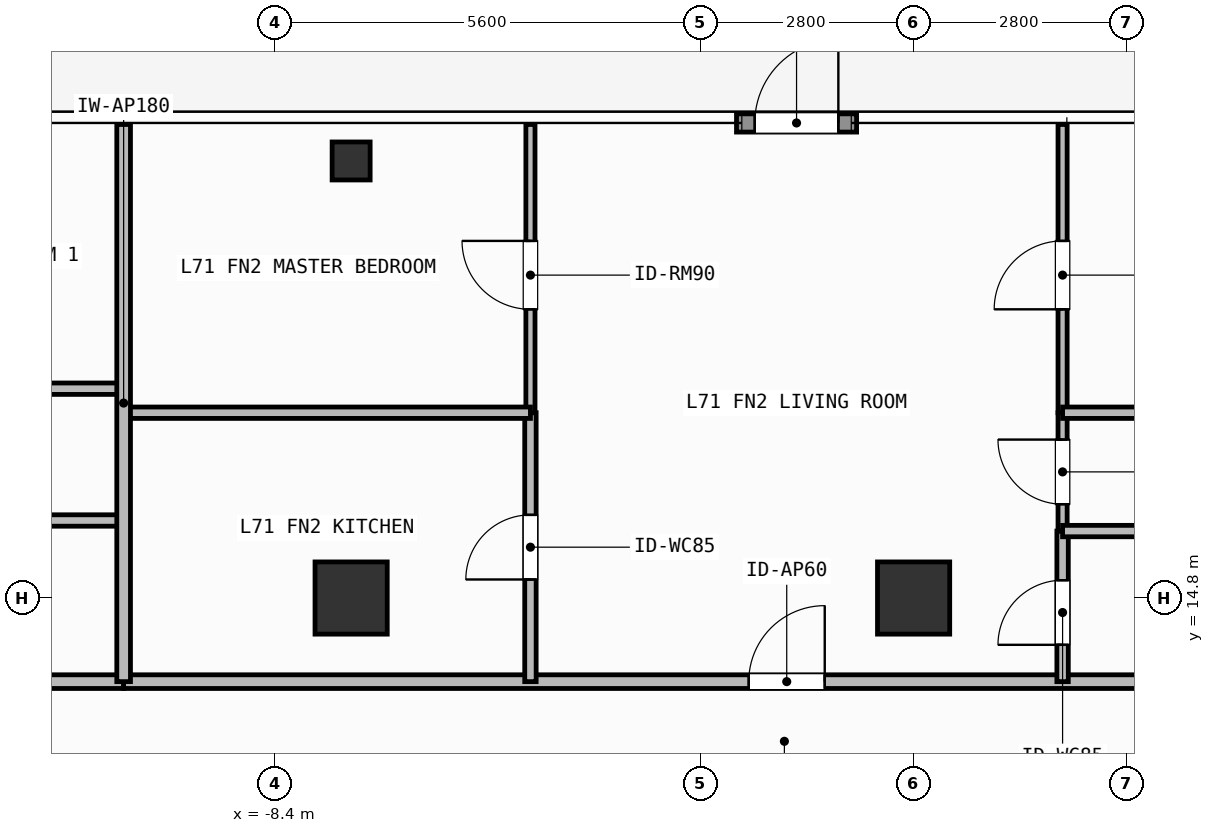
"""IFC4 building model, lengths in metres.
Left out: names, types, materials, properties, quantities, classifications, styles, units other than length and angle.
Written with IfcOpenShell. Run it as: python <this file> out.ifc"""

import sys

from ifc_helpers import new_model, si_unit, direction, frame, frame_2d, origin, origin_2d, place, context, subcontext, project, spatial, rectangle, hollow_rectangle, extrude, element, fill, save


model = new_model("IFC4")
c1 = context("Model", 3, precision=1e-05, world=origin(), true_north=direction((0.0, 1.0)))
c2 = subcontext(c1, "Body", "Model", "MODEL_VIEW")
j1 = project(units=[si_unit("LENGTHUNIT", "METRE"), si_unit("PLANEANGLEUNIT", "RADIAN")], contexts=[c1])
p1 = place(None, origin())
s1 = spatial("IfcSite", under=j1, at=p1, CompositionType="ELEMENT")
p2 = place(p1, origin())
s2 = spatial("IfcBuilding", under=s1, at=p2, CompositionType="ELEMENT")
p3 = place(p2, frame((0.0, 0.0, 289.8)))
s3 = spatial("IfcBuildingStorey", under=s2, at=p3, CompositionType="ELEMENT", Elevation=289.8)
for number, where, z_axis, x_axis in (
    (1, (-7.4, 14.8, 0.0), (0.0, 0.0, 1.0), (1.0, 0.0, 0.0)),
    (2, (0.0, 14.8, 0.0), (0.0, 0.0, 1.0), (1.0, 0.0, 0.0)),
):
    element("IfcColumn", number, at=place(p3, frame(where, z_axis=z_axis, x_axis=x_axis)), inside=s3, PredefinedType="COLUMN", context=c2, shape_type="SweptSolid", body=[
        extrude(rectangle(XDim=0.95, YDim=0.95, at=origin_2d()), origin(), (0.0, 0.0, 1.0), 3.9),
    ])
p4 = place(p3, frame((-7.4, 20.55, 0.0), z_axis=(0.0, 0.0, 1.0), x_axis=(1.0, 0.0, 0.0)))
e3 = element("IfcColumn", 3, at=p4, inside=s3, PredefinedType="COLUMN", context=c2, shape_type="SweptSolid", body=[
    extrude(hollow_rectangle(XDim=0.5, YDim=0.5, WallThickness=0.025, at=origin_2d()), origin(), (0.0, 0.0, 1.0), 3.9),
])
p5 = place(p3, frame((-2.33, 21.05, 0.0), z_axis=(0.0, 0.0, 1.0), x_axis=(1.0, 0.0, 0.0)))
e4 = element("IfcWall", 4, at=p5, inside=s3, PredefinedType="SOLIDWALL", context=c2, shape_type="SweptSolid", body=[
    extrude(rectangle(XDim=1.58, YDim=0.24, at=frame_2d((0.79, 0.0))), origin(), (0.0, 0.0, 1.0), 3.68),
])
p6 = place(p5, frame((0.24, 0.0, 0.0)))
e5 = element("IfcOpeningElement", 5, at=p6, cuts=e4, PredefinedType="OPENING", context=c2, shape_type="SweptSolid", body=[
    extrude(rectangle(XDim=1.1, YDim=2.2, at=frame_2d((0.55, 1.1))), frame((0.0, 0.13, 0.0), z_axis=(0.0, -1.0, 0.0), x_axis=(1.0, 0.0, 0.0)), (0.0, 0.0, 1.0), 0.26),
])
p7 = place(p3, frame((-19.32, 13.7, 0.0), z_axis=(0.0, 0.0, 1.0), x_axis=(1.0, 0.0, 0.0)))
e6 = element("IfcWall", 6, at=p7, inside=s3, PredefinedType="PARTITIONING", context=c2, shape_type="SweptSolid", body=[
    extrude(rectangle(XDim=8.927, YDim=0.18, at=frame_2d((4.463, 0.0))), origin(), (0.0, 0.0, 1.0), 3.68),
])
p8 = place(p7, frame((1.398, 0.0, 0.0)))
e7 = element("IfcOpeningElement", 7, at=p8, cuts=e6, PredefinedType="OPENING", context=c2, shape_type="SweptSolid", body=[
    extrude(rectangle(XDim=1.0, YDim=2.2, at=frame_2d((0.5, 1.1))), frame((0.0, 0.1, 0.0), z_axis=(0.0, -1.0, 0.0), x_axis=(1.0, 0.0, 0.0)), (0.0, 0.0, 1.0), 0.2),
])
p9 = place(p3, frame((-10.393, 13.7, 0.0), z_axis=(0.0, 0.0, 1.0), x_axis=(1.0, 0.0, 0.0)))
e8 = element("IfcWall", 8, at=p9, inside=s3, PredefinedType="PARTITIONING", context=c2, shape_type="SweptSolid", body=[
    extrude(rectangle(XDim=15.835, YDim=0.18, at=frame_2d((7.917, 0.0))), origin(), (0.0, 0.0, 1.0), 3.68),
])
p10 = place(p9, frame((8.224, 0.0, 0.0)))
e9 = element("IfcOpeningElement", 9, at=p10, cuts=e8, PredefinedType="OPENING", context=c2, shape_type="SweptSolid", body=[
    extrude(rectangle(XDim=1.0, YDim=2.2, at=frame_2d((0.5, 1.1))), frame((0.0, 0.1, 0.0), z_axis=(0.0, -1.0, 0.0), x_axis=(1.0, 0.0, 0.0)), (0.0, 0.0, 1.0), 0.2),
])
p11 = place(p3, frame((-5.041, 13.7, 0.0), z_axis=(0.0, 0.0, 1.0), x_axis=(0.0, 1.0, 0.0)))
e10 = element("IfcWall", 10, at=p11, inside=s3, PredefinedType="PARTITIONING", context=c2, shape_type="SweptSolid", body=[
    extrude(rectangle(XDim=3.538, YDim=0.15, at=frame_2d((1.769, 0.0))), origin(), (0.0, 0.0, 1.0), 3.68),
])
p12 = place(p11, frame((1.344, 0.0, 0.0)))
e11 = element("IfcOpeningElement", 11, at=p12, cuts=e10, PredefinedType="OPENING", context=c2, shape_type="SweptSolid", body=[
    extrude(rectangle(XDim=0.85, YDim=2.1, at=frame_2d((0.425, 1.05))), frame((0.0, 0.085, 0.0), z_axis=(0.0, -1.0, 0.0), x_axis=(1.0, 0.0, 0.0)), (0.0, 0.0, 1.0), 0.17),
])
p13 = place(p3, frame((-5.041, 17.238, 0.0), z_axis=(0.0, 0.0, 1.0), x_axis=(0.0, 1.0, 0.0)))
e12 = element("IfcWall", 12, at=p13, inside=s3, PredefinedType="PARTITIONING", context=c2, shape_type="SweptSolid", body=[
    extrude(rectangle(XDim=3.792, YDim=0.12, at=frame_2d((1.896, 0.0))), origin(), (0.0, 0.0, 1.0), 3.68),
])
p14 = place(p13, frame((1.36, 0.0, 0.0)))
e13 = element("IfcOpeningElement", 13, at=p14, cuts=e12, PredefinedType="OPENING", context=c2, shape_type="SweptSolid", body=[
    extrude(rectangle(XDim=0.9, YDim=2.1, at=frame_2d((0.45, 1.05))), frame((0.0, 0.07, 0.0), z_axis=(0.0, -1.0, 0.0), x_axis=(1.0, 0.0, 0.0)), (0.0, 0.0, 1.0), 0.14),
])
p15 = place(p3, frame((1.96, 13.7, 0.0), z_axis=(0.0, 0.0, 1.0), x_axis=(0.0, 1.0, 0.0)))
e14 = element("IfcWall", 14, at=p15, inside=s3, PredefinedType="PARTITIONING", context=c2, shape_type="SweptSolid", body=[
    extrude(rectangle(XDim=1.981, YDim=0.15, at=frame_2d((0.99, 0.0))), origin(), (0.0, 0.0, 1.0), 3.68),
])
p16 = place(p15, frame((0.484, 0.0, 0.0)))
e15 = element("IfcOpeningElement", 15, at=p16, cuts=e14, PredefinedType="OPENING", context=c2, shape_type="SweptSolid", body=[
    extrude(rectangle(XDim=0.85, YDim=2.1, at=frame_2d((0.425, 1.05))), frame((0.0, 0.085, 0.0), z_axis=(0.0, -1.0, 0.0), x_axis=(1.0, 0.0, 0.0)), (0.0, 0.0, 1.0), 0.17),
])
p17 = place(p3, frame((1.96, 15.681, 0.0), z_axis=(0.0, 0.0, 1.0), x_axis=(0.0, 1.0, 0.0)))
e16 = element("IfcWall", 16, at=p17, inside=s3, PredefinedType="PARTITIONING", context=c2, shape_type="SweptSolid", body=[
    extrude(rectangle(XDim=1.557, YDim=0.12, at=frame_2d((0.779, 0.0))), origin(), (0.0, 0.0, 1.0), 3.68),
])
p18 = place(p17, frame((0.354, 0.0, 0.0)))
e17 = element("IfcOpeningElement", 17, at=p18, cuts=e16, PredefinedType="OPENING", context=c2, shape_type="SweptSolid", body=[
    extrude(rectangle(XDim=0.85, YDim=2.1, at=frame_2d((0.425, 1.05))), frame((0.0, 0.07, 0.0), z_axis=(0.0, -1.0, 0.0), x_axis=(1.0, 0.0, 0.0)), (0.0, 0.0, 1.0), 0.14),
])
p19 = place(p3, frame((1.96, 17.238, 0.0), z_axis=(0.0, 0.0, 1.0), x_axis=(0.0, 1.0, 0.0)))
e18 = element("IfcWall", 18, at=p19, inside=s3, PredefinedType="PARTITIONING", context=c2, shape_type="SweptSolid", body=[
    extrude(rectangle(XDim=3.792, YDim=0.12, at=frame_2d((1.896, 0.0))), origin(), (0.0, 0.0, 1.0), 3.68),
])
p20 = place(p19, frame((1.36, 0.0, 0.0)))
e19 = element("IfcOpeningElement", 19, at=p20, cuts=e18, PredefinedType="OPENING", context=c2, shape_type="SweptSolid", body=[
    extrude(rectangle(XDim=0.9, YDim=2.1, at=frame_2d((0.45, 1.05))), frame((0.0, 0.07, 0.0), z_axis=(0.0, -1.0, 0.0), x_axis=(1.0, 0.0, 0.0)), (0.0, 0.0, 1.0), 0.14),
])
for number, where, z_axis, x_axis in (
    (20, (-16.57, 15.82, 0.0), (0.0, 0.0, 1.0), (1.0, 0.0, 0.0)),
    (21, (-16.57, 17.554, 0.0), (0.0, 0.0, 1.0), (1.0, 0.0, 0.0)),
):
    element("IfcWall", number, at=place(p3, frame(where, z_axis=z_axis, x_axis=x_axis)), inside=s3, PredefinedType="PARTITIONING", context=c2, shape_type="SweptSolid", body=[
        extrude(rectangle(XDim=6.177, YDim=0.15, at=frame_2d((3.088, 0.0))), origin(), (0.0, 0.0, 1.0), 3.68),
    ])
p21 = place(p3, frame((-10.393, 17.238, 0.0), z_axis=(0.0, 0.0, 1.0), x_axis=(1.0, 0.0, 0.0)))
e22 = element("IfcWall", 22, at=p21, inside=s3, PredefinedType="PARTITIONING", context=c2, shape_type="SweptSolid", body=[
    extrude(rectangle(XDim=5.352, YDim=0.15, at=frame_2d((2.676, 0.0))), origin(), (0.0, 0.0, 1.0), 3.68),
])
for number, where, z_axis, x_axis in (
    (23, (1.96, 15.681, 0.0), (0.0, 0.0, 1.0), (1.0, 0.0, 0.0)),
    (24, (1.96, 17.238, 0.0), (0.0, 0.0, 1.0), (1.0, 0.0, 0.0)),
):
    element("IfcWall", number, at=place(p3, frame(where, z_axis=z_axis, x_axis=x_axis)), inside=s3, PredefinedType="PARTITIONING", context=c2, shape_type="SweptSolid", body=[
        extrude(rectangle(XDim=3.482, YDim=0.15, at=frame_2d((1.741, 0.0))), origin(), (0.0, 0.0, 1.0), 3.68),
    ])
p22 = place(p3, frame((-10.393, 13.7, 0.0), z_axis=(0.0, 0.0, 1.0), x_axis=(0.0, 1.0, 0.0)))
e25 = element("IfcWall", 25, at=p22, inside=s3, PredefinedType="PARTITIONING", context=c2, shape_type="SweptSolid", body=[
    extrude(rectangle(XDim=7.33, YDim=0.18, at=frame_2d((3.665, 0.0))), origin(), (0.0, 0.0, 1.0), 3.68),
])
p23 = place(p6, origin())
e26 = element("IfcDoor", 26, at=p23, inside=s3, OperationType="SINGLE_SWING_RIGHT", PredefinedType="DOOR", context=c2, shape_type="SweptSolid", body=[
    extrude(rectangle(XDim=1.1, YDim=2.2, at=frame_2d((0.55, 1.1))), frame((0.0, 0.025, 0.0), z_axis=(0.0, -1.0, 0.0), x_axis=(1.0, 0.0, 0.0)), (0.0, 0.0, 1.0), 0.05),
])
fill(e5, e26)
p24 = place(p10, origin())
e27 = element("IfcDoor", 27, at=p24, inside=s3, OperationType="SINGLE_SWING_RIGHT", PredefinedType="DOOR", context=c2, shape_type="SweptSolid", body=[
    extrude(rectangle(XDim=1.0, YDim=2.2, at=frame_2d((0.5, 1.1))), frame((0.0, 0.025, 0.0), z_axis=(0.0, -1.0, 0.0), x_axis=(1.0, 0.0, 0.0)), (0.0, 0.0, 1.0), 0.05),
])
fill(e9, e27)
p25 = place(p12, origin())
e28 = element("IfcDoor", 28, at=p25, inside=s3, OperationType="SINGLE_SWING_LEFT", PredefinedType="DOOR", context=c2, shape_type="SweptSolid", body=[
    extrude(rectangle(XDim=0.85, YDim=2.1, at=frame_2d((0.425, 1.05))), frame((0.0, 0.025, 0.0), z_axis=(0.0, -1.0, 0.0), x_axis=(1.0, 0.0, 0.0)), (0.0, 0.0, 1.0), 0.05),
])
fill(e11, e28)
p26 = place(p14, origin())
e29 = element("IfcDoor", 29, at=p26, inside=s3, OperationType="SINGLE_SWING_RIGHT", PredefinedType="DOOR", context=c2, shape_type="SweptSolid", body=[
    extrude(rectangle(XDim=0.9, YDim=2.1, at=frame_2d((0.45, 1.05))), frame((0.0, 0.025, 0.0), z_axis=(0.0, -1.0, 0.0), x_axis=(1.0, 0.0, 0.0)), (0.0, 0.0, 1.0), 0.05),
])
fill(e13, e29)
p27 = place(p16, origin())
e30 = element("IfcDoor", 30, at=p27, inside=s3, OperationType="SINGLE_SWING_LEFT", PredefinedType="DOOR", context=c2, shape_type="SweptSolid", body=[
    extrude(rectangle(XDim=0.85, YDim=2.1, at=frame_2d((0.425, 1.05))), frame((0.0, 0.025, 0.0), z_axis=(0.0, -1.0, 0.0), x_axis=(1.0, 0.0, 0.0)), (0.0, 0.0, 1.0), 0.05),
])
fill(e15, e30)
p28 = place(p18, origin())
e31 = element("IfcDoor", 31, at=p28, inside=s3, OperationType="SINGLE_SWING_RIGHT", PredefinedType="DOOR", context=c2, shape_type="SweptSolid", body=[
    extrude(rectangle(XDim=0.85, YDim=2.1, at=frame_2d((0.425, 1.05))), frame((0.0, 0.025, 0.0), z_axis=(0.0, -1.0, 0.0), x_axis=(1.0, 0.0, 0.0)), (0.0, 0.0, 1.0), 0.05),
])
fill(e17, e31)
p29 = place(p20, origin())
e32 = element("IfcDoor", 32, at=p29, inside=s3, OperationType="SINGLE_SWING_LEFT", PredefinedType="DOOR", context=c2, shape_type="SweptSolid", body=[
    extrude(rectangle(XDim=0.9, YDim=2.1, at=frame_2d((0.45, 1.05))), frame((0.0, 0.025, 0.0), z_axis=(0.0, -1.0, 0.0), x_axis=(1.0, 0.0, 0.0)), (0.0, 0.0, 1.0), 0.05),
])
fill(e19, e32)
save(model, sys.argv[1])
